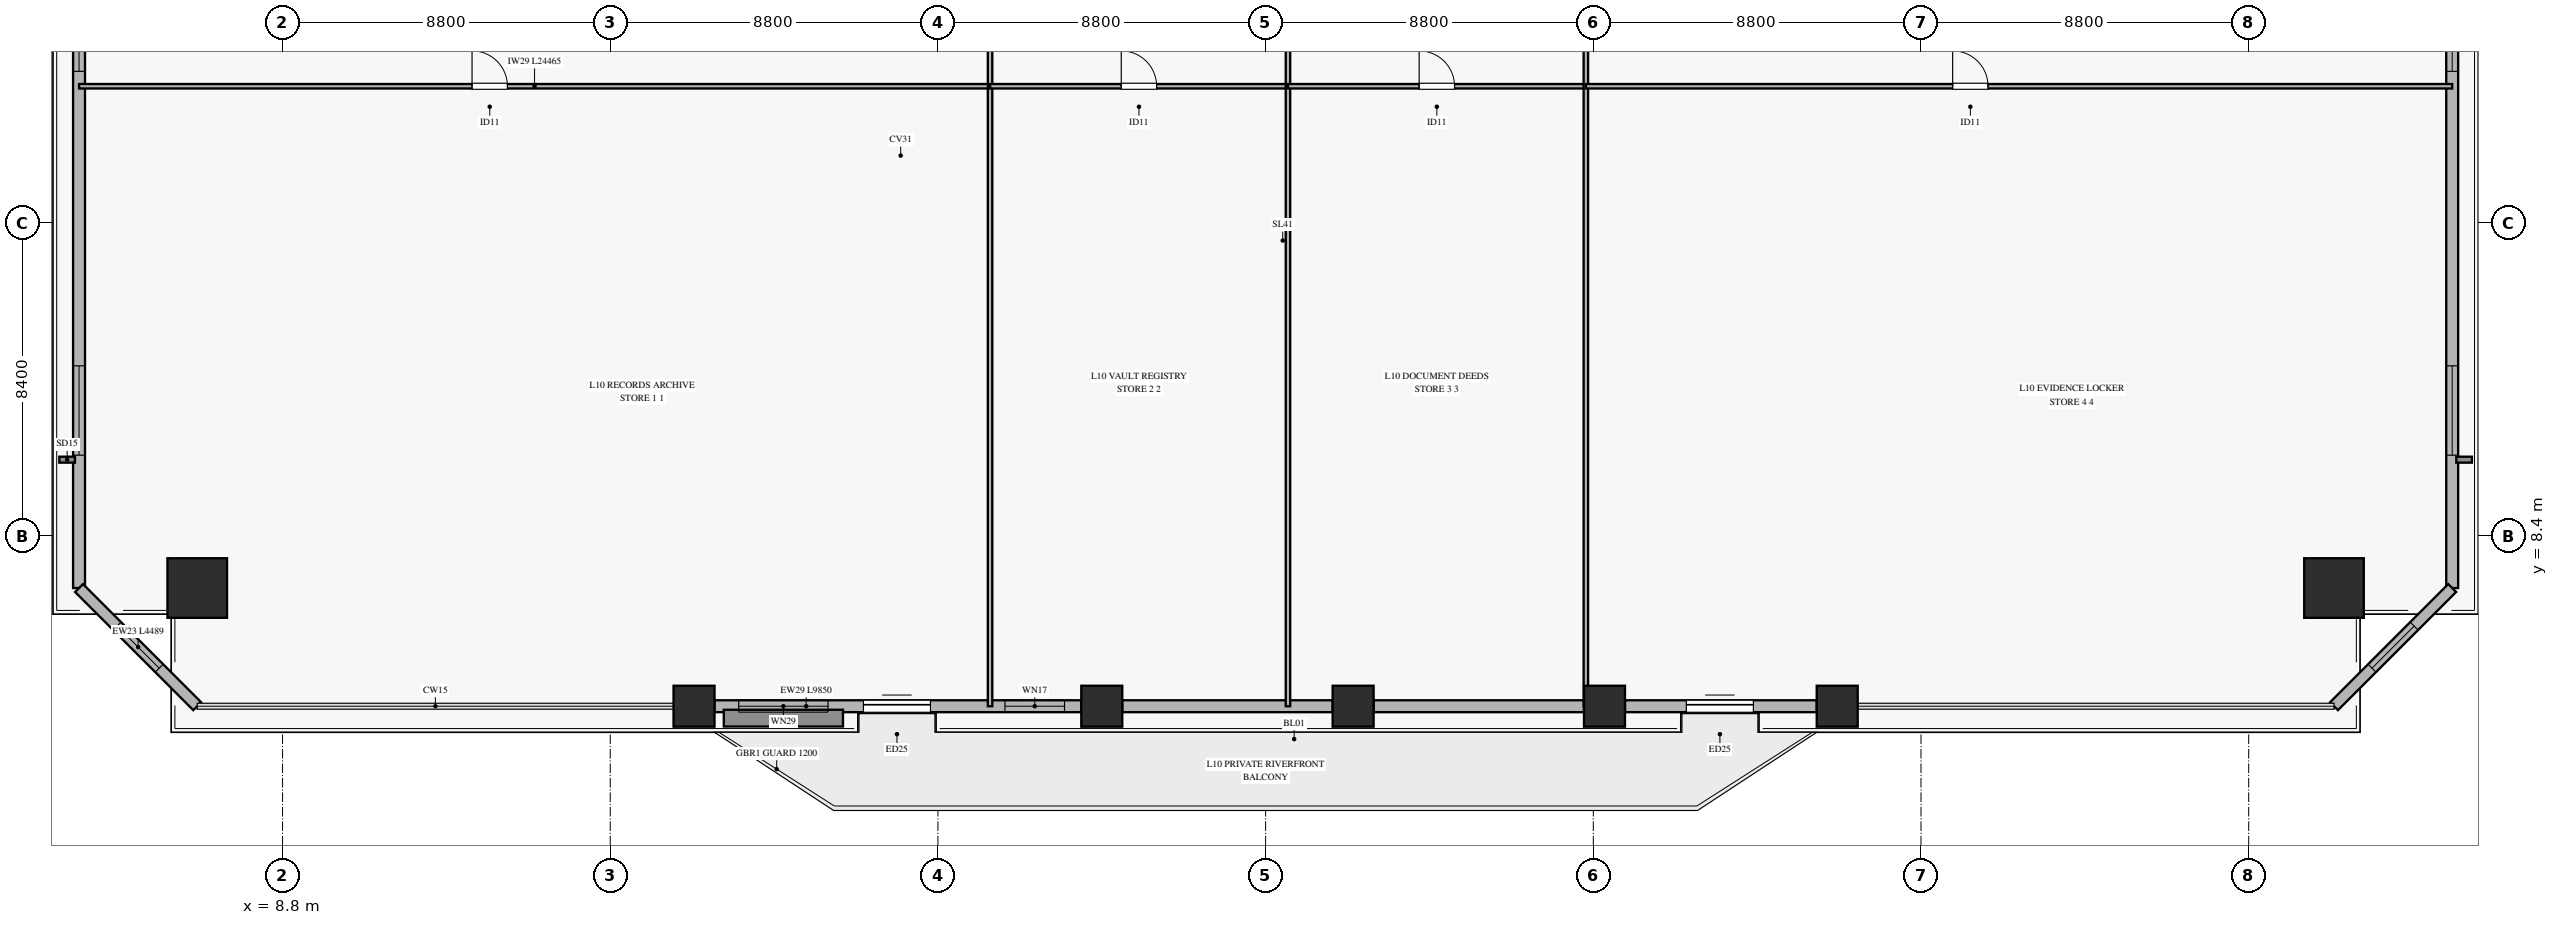
"""IFC4 building model, lengths in metres.
Left out: names, types, materials, properties, quantities, classifications, styles, units other than length and angle.
Written with IfcOpenShell. Run it as: python <this file> out.ifc"""

import sys

from ifc_helpers import new_model, si_unit, direction, frame, frame_2d, origin, origin_2d, place, context, subcontext, project, spatial, rectangle, hollow_rectangle, extrude, source, transform, mapped, element, fill, save


model = new_model("IFC4")
c1 = context("Model", 3, precision=1e-05, world=origin(), true_north=direction((0.0, 1.0)))
c2 = subcontext(c1, "Body", "Model", "MODEL_VIEW")
j1 = project(units=[si_unit("LENGTHUNIT", "METRE"), si_unit("PLANEANGLEUNIT", "RADIAN")], contexts=[c1])
p1 = place(None, origin())
s1 = spatial("IfcSite", under=j1, at=p1, CompositionType="ELEMENT")
p2 = place(p1, origin())
s2 = spatial("IfcBuilding", under=s1, at=p2, CompositionType="ELEMENT")
p3 = place(p2, frame((0.0, 0.0, 41.0)))
s3 = spatial("IfcBuildingStorey", under=s2, at=p3, CompositionType="ELEMENT", Elevation=41.0)
m1 = source(origin(), c2, "Body", "SweptSolid", [
    extrude(hollow_rectangle(XDim=1.6, YDim=1.6, WallThickness=0.075, at=origin_2d()), origin(), (0.0, 0.0, 1.0), 3.68),
])
for number, where, z_axis, x_axis in (
    (1, (6.509, 7.001, 0.0), (0.0, 0.0, 1.0), (1.0, 0.0, 0.0)),
    (2, (63.891, 7.001, 0.0), (0.0, 0.0, 1.0), (1.0, 0.0, 0.0)),
):
    element("IfcColumn", number, at=place(p3, frame(where, z_axis=z_axis, x_axis=x_axis)), inside=s3, PredefinedType="COLUMN", context=c2, shape_type="MappedRepresentation", body=[
        mapped(m1, transform((0.0, 0.0, 0.0), x_axis=(1.0, 0.0, 0.0), y_axis=(0.0, 1.0, 0.0), z_axis=(0.0, 0.0, 1.0), scale=1.0)),
    ])
m2 = source(origin(), c2, "Body", "SweptSolid", [
    extrude(hollow_rectangle(XDim=1.1, YDim=1.1, WallThickness=0.05, at=origin_2d()), origin(), (0.0, 0.0, 1.0), 3.68),
])
for number, where, z_axis, x_axis in (
    (3, (19.85, 3.827, 0.0), (0.0, 0.0, 1.0), (1.0, 0.0, 0.0)),
    (4, (30.8, 3.827, 0.0), (0.0, 0.0, 1.0), (1.0, 0.0, 0.0)),
    (5, (37.55, 3.827, 0.0), (0.0, 0.0, 1.0), (1.0, 0.0, 0.0)),
    (6, (44.3, 3.827, 0.0), (0.0, 0.0, 1.0), (1.0, 0.0, 0.0)),
    (7, (50.55, 3.827, 0.0), (0.0, 0.0, 1.0), (1.0, 0.0, 0.0)),
):
    element("IfcColumn", number, at=place(p3, frame(where, z_axis=z_axis, x_axis=x_axis)), inside=s3, PredefinedType="COLUMN", context=c2, shape_type="MappedRepresentation", body=[
        mapped(m2, transform((0.0, 0.0, 0.0), x_axis=(1.0, 0.0, 0.0), y_axis=(0.0, 1.0, 0.0), z_axis=(0.0, 0.0, 1.0), scale=1.0)),
    ])
p4 = place(p3, frame((20.4, 3.827, 0.0), z_axis=(0.0, 0.0, 1.0), x_axis=(1.0, 0.0, 0.0)))
e8 = element("IfcWall", 8, at=p4, inside=s3, PredefinedType="SOLIDWALL", context=c2, shape_type="SweptSolid", body=[
    extrude(rectangle(XDim=9.85, YDim=0.32, at=frame_2d((4.925, 0.0))), origin(), (0.0, 0.0, 1.0), 3.16),
])
p5 = place(p4, frame((4.0, 0.0, 0.0)))
e9 = element("IfcOpeningElement", 9, at=p5, cuts=e8, PredefinedType="OPENING", context=c2, shape_type="SweptSolid", body=[
    extrude(rectangle(XDim=1.8, YDim=2.25, at=frame_2d((0.9, 1.125))), frame((0.0, 0.17, 0.0), z_axis=(0.0, -1.0, 0.0), x_axis=(1.0, 0.0, 0.0)), (0.0, 0.0, 1.0), 0.34),
])
p6 = place(p4, frame((0.65, 0.0, 0.45)))
e10 = element("IfcOpeningElement", 10, at=p6, cuts=e8, PredefinedType="OPENING", context=c2, shape_type="SweptSolid", body=[
    extrude(rectangle(XDim=2.4, YDim=2.1, at=frame_2d((1.2, 1.05))), frame((0.0, 0.17, 0.0), z_axis=(0.0, -1.0, 0.0), x_axis=(1.0, 0.0, 0.0)), (0.0, 0.0, 1.0), 0.34),
])
p7 = place(p4, frame((7.8, 0.0, 0.45)))
e11 = element("IfcOpeningElement", 11, at=p7, cuts=e8, PredefinedType="OPENING", context=c2, shape_type="SweptSolid", body=[
    extrude(rectangle(XDim=1.6, YDim=2.0, at=frame_2d((0.8, 1.0))), frame((0.0, 0.17, 0.0), z_axis=(0.0, -1.0, 0.0), x_axis=(1.0, 0.0, 0.0)), (0.0, 0.0, 1.0), 0.34),
])
for number, where, z_axis, x_axis in (
    (12, (31.35, 3.827, 0.0), (0.0, 0.0, 1.0), (1.0, 0.0, 0.0)),
    (13, (38.1, 3.827, 0.0), (0.0, 0.0, 1.0), (1.0, 0.0, 0.0)),
):
    element("IfcWall", number, at=place(p3, frame(where, z_axis=z_axis, x_axis=x_axis)), inside=s3, PredefinedType="SOLIDWALL", context=c2, shape_type="SweptSolid", body=[
        extrude(rectangle(XDim=5.65, YDim=0.32, at=frame_2d((2.825, 0.0))), origin(), (0.0, 0.0, 1.0), 3.16),
    ])
p8 = place(p3, frame((44.85, 3.827, 0.0), z_axis=(0.0, 0.0, 1.0), x_axis=(1.0, 0.0, 0.0)))
e14 = element("IfcWall", 14, at=p8, inside=s3, PredefinedType="SOLIDWALL", context=c2, shape_type="SweptSolid", body=[
    extrude(rectangle(XDim=5.15, YDim=0.32, at=frame_2d((2.575, 0.0))), origin(), (0.0, 0.0, 1.0), 3.16),
])
p9 = place(p8, frame((1.65, 0.0, 0.0)))
e15 = element("IfcOpeningElement", 15, at=p9, cuts=e14, PredefinedType="OPENING", context=c2, shape_type="SweptSolid", body=[
    extrude(rectangle(XDim=1.8, YDim=2.25, at=frame_2d((0.9, 1.125))), frame((0.0, 0.17, 0.0), z_axis=(0.0, -1.0, 0.0), x_axis=(1.0, 0.0, 0.0)), (0.0, 0.0, 1.0), 0.34),
])
p10 = place(p3, frame((3.335, 7.001, 0.0), z_axis=(0.0, 0.0, 1.0), x_axis=(0.0, 1.0, 0.0)))
e16 = element("IfcWall", 16, at=p10, inside=s3, PredefinedType="SOLIDWALL", context=c2, shape_type="SweptSolid", body=[
    extrude(rectangle(XDim=17.412, YDim=0.32, at=frame_2d((8.706, 0.0))), origin(), (0.0, 0.0, 1.0), 3.16),
])
p11 = place(p10, frame((3.567, 0.0, 0.45)))
e17 = element("IfcOpeningElement", 17, at=p11, cuts=e16, PredefinedType="OPENING", context=c2, shape_type="SweptSolid", body=[
    extrude(rectangle(XDim=2.4, YDim=2.1, at=frame_2d((1.2, 1.05))), frame((0.0, 0.17, 0.0), z_axis=(0.0, -1.0, 0.0), x_axis=(1.0, 0.0, 0.0)), (0.0, 0.0, 1.0), 0.34),
])
p12 = place(p10, frame((13.875, 0.0, 0.45)))
e18 = element("IfcOpeningElement", 18, at=p12, cuts=e16, PredefinedType="OPENING", context=c2, shape_type="SweptSolid", body=[
    extrude(rectangle(XDim=2.4, YDim=2.1, at=frame_2d((1.2, 1.05))), frame((0.0, 0.17, 0.0), z_axis=(0.0, -1.0, 0.0), x_axis=(1.0, 0.0, 0.0)), (0.0, 0.0, 1.0), 0.34),
])
p13 = place(p3, frame((67.065, 7.001, 0.0), z_axis=(0.0, 0.0, 1.0), x_axis=(0.0, 1.0, 0.0)))
e19 = element("IfcWall", 19, at=p13, inside=s3, PredefinedType="SOLIDWALL", context=c2, shape_type="SweptSolid", body=[
    extrude(rectangle(XDim=17.412, YDim=0.32, at=frame_2d((8.706, 0.0))), origin(), (0.0, 0.0, 1.0), 3.16),
])
p14 = place(p13, frame((3.567, 0.0, 0.45)))
e20 = element("IfcOpeningElement", 20, at=p14, cuts=e19, PredefinedType="OPENING", context=c2, shape_type="SweptSolid", body=[
    extrude(rectangle(XDim=2.4, YDim=2.1, at=frame_2d((1.2, 1.05))), frame((0.0, 0.17, 0.0), z_axis=(0.0, -1.0, 0.0), x_axis=(1.0, 0.0, 0.0)), (0.0, 0.0, 1.0), 0.34),
])
p15 = place(p13, frame((13.875, 0.0, 0.45)))
e21 = element("IfcOpeningElement", 21, at=p15, cuts=e19, PredefinedType="OPENING", context=c2, shape_type="SweptSolid", body=[
    extrude(rectangle(XDim=2.4, YDim=2.1, at=frame_2d((1.2, 1.05))), frame((0.0, 0.17, 0.0), z_axis=(0.0, -1.0, 0.0), x_axis=(1.0, 0.0, 0.0)), (0.0, 0.0, 1.0), 0.34),
])
p16 = place(p3, frame((3.335, 7.001, 0.0), z_axis=(0.0, 0.0, 1.0), x_axis=(0.707106781187, -0.707106781187, 0.0)))
e22 = element("IfcWall", 22, at=p16, inside=s3, PredefinedType="SOLIDWALL", context=c2, shape_type="SweptSolid", body=[
    extrude(rectangle(XDim=4.489, YDim=0.3, at=frame_2d((2.244, 0.0))), origin(), (0.0, 0.0, 1.0), 3.16),
])
p17 = place(p16, frame((1.444, 0.0, 0.45)))
e23 = element("IfcOpeningElement", 23, at=p17, cuts=e22, PredefinedType="OPENING", context=c2, shape_type="SweptSolid", body=[
    extrude(rectangle(XDim=1.6, YDim=2.0, at=frame_2d((0.8, 1.0))), frame((0.0, 0.16, 0.0), z_axis=(0.0, -1.0, 0.0), x_axis=(1.0, 0.0, 0.0)), (0.0, 0.0, 1.0), 0.32),
])
p18 = place(p3, frame((63.891, 3.827, 0.0), z_axis=(0.0, 0.0, 1.0), x_axis=(0.707079585295, 0.707133976032, 0.0)))
e24 = element("IfcWall", 24, at=p18, inside=s3, PredefinedType="SOLIDWALL", context=c2, shape_type="SweptSolid", body=[
    extrude(rectangle(XDim=4.489, YDim=0.3, at=frame_2d((2.244, 0.0))), origin(), (0.0, 0.0, 1.0), 3.16),
])
p19 = place(p18, frame((1.444, 0.0, 0.45)))
e25 = element("IfcOpeningElement", 25, at=p19, cuts=e24, PredefinedType="OPENING", context=c2, shape_type="SweptSolid", body=[
    extrude(rectangle(XDim=1.6, YDim=2.0, at=frame_2d((0.8, 1.0))), frame((0.0, 0.16, 0.0), z_axis=(0.0, -1.0, 0.0), x_axis=(1.0, 0.0, 0.0)), (0.0, 0.0, 1.0), 0.32),
])
p20 = place(p3, frame((3.335, 20.476, 0.0), z_axis=(0.0, 0.0, 1.0), x_axis=(1.0, 0.0, 0.0)))
e26 = element("IfcWall", 26, at=p20, inside=s3, PredefinedType="PARTITIONING", context=c2, shape_type="SweptSolid", body=[
    extrude(rectangle(XDim=24.465, YDim=0.12, at=frame_2d((12.232, 0.0))), origin(), (0.0, 0.0, 1.0), 2.765),
])
p21 = place(p20, frame((10.554, 0.0, 0.0)))
e27 = element("IfcOpeningElement", 27, at=p21, cuts=e26, PredefinedType="OPENING", context=c2, shape_type="SweptSolid", body=[
    extrude(rectangle(XDim=0.95, YDim=2.1, at=frame_2d((0.475, 1.05))), frame((0.0, 0.07, 0.0), z_axis=(0.0, -1.0, 0.0), x_axis=(1.0, 0.0, 0.0)), (0.0, 0.0, 1.0), 0.14),
])
p22 = place(p3, frame((27.8, 3.827, 0.0), z_axis=(0.0, 0.0, 1.0), x_axis=(0.0, 1.0, 0.0)))
e28 = element("IfcWall", 28, at=p22, inside=s3, PredefinedType="PARTITIONING", context=c2, shape_type="SweptSolid", body=[
    extrude(rectangle(XDim=29.573, YDim=0.12, at=frame_2d((14.787, 0.0))), origin(), (0.0, 0.0, 1.0), 3.165),
])
p23 = place(p3, frame((27.8, 20.476, 0.0), z_axis=(0.0, 0.0, 1.0), x_axis=(1.0, 0.0, 0.0)))
e29 = element("IfcWall", 29, at=p23, inside=s3, PredefinedType="PARTITIONING", context=c2, shape_type="SweptSolid", body=[
    extrude(rectangle(XDim=8.0, YDim=0.12, at=frame_2d((4.0, 0.0))), origin(), (0.0, 0.0, 1.0), 2.765),
])
p24 = place(p23, frame((3.523, 0.0, 0.0)))
e30 = element("IfcOpeningElement", 30, at=p24, cuts=e29, PredefinedType="OPENING", context=c2, shape_type="SweptSolid", body=[
    extrude(rectangle(XDim=0.95, YDim=2.1, at=frame_2d((0.475, 1.05))), frame((0.0, 0.07, 0.0), z_axis=(0.0, -1.0, 0.0), x_axis=(1.0, 0.0, 0.0)), (0.0, 0.0, 1.0), 0.14),
])
p25 = place(p3, frame((35.8, 3.827, 0.0), z_axis=(0.0, 0.0, 1.0), x_axis=(0.0, 1.0, 0.0)))
e31 = element("IfcWall", 31, at=p25, inside=s3, PredefinedType="PARTITIONING", context=c2, shape_type="SweptSolid", body=[
    extrude(rectangle(XDim=29.573, YDim=0.12, at=frame_2d((14.787, 0.0))), origin(), (0.0, 0.0, 1.0), 3.165),
])
p26 = place(p3, frame((35.8, 20.476, 0.0), z_axis=(0.0, 0.0, 1.0), x_axis=(1.0, 0.0, 0.0)))
e32 = element("IfcWall", 32, at=p26, inside=s3, PredefinedType="PARTITIONING", context=c2, shape_type="SweptSolid", body=[
    extrude(rectangle(XDim=8.0, YDim=0.12, at=frame_2d((4.0, 0.0))), origin(), (0.0, 0.0, 1.0), 2.765),
])
p27 = place(p26, frame((3.523, 0.0, 0.0)))
e33 = element("IfcOpeningElement", 33, at=p27, cuts=e32, PredefinedType="OPENING", context=c2, shape_type="SweptSolid", body=[
    extrude(rectangle(XDim=0.95, YDim=2.1, at=frame_2d((0.475, 1.05))), frame((0.0, 0.07, 0.0), z_axis=(0.0, -1.0, 0.0), x_axis=(1.0, 0.0, 0.0)), (0.0, 0.0, 1.0), 0.14),
])
p28 = place(p3, frame((43.8, 3.827, 0.0), z_axis=(0.0, 0.0, 1.0), x_axis=(0.0, 1.0, 0.0)))
e34 = element("IfcWall", 34, at=p28, inside=s3, PredefinedType="PARTITIONING", context=c2, shape_type="SweptSolid", body=[
    extrude(rectangle(XDim=29.573, YDim=0.12, at=frame_2d((14.787, 0.0))), origin(), (0.0, 0.0, 1.0), 3.215),
])
p29 = place(p3, frame((43.8, 20.476, 0.0), z_axis=(0.0, 0.0, 1.0), x_axis=(1.0, 0.0, 0.0)))
e35 = element("IfcWall", 35, at=p29, inside=s3, PredefinedType="PARTITIONING", context=c2, shape_type="SweptSolid", body=[
    extrude(rectangle(XDim=23.265, YDim=0.12, at=frame_2d((11.632, 0.0))), origin(), (0.0, 0.0, 1.0), 2.765),
])
p30 = place(p29, frame((9.85, 0.0, 0.0)))
e36 = element("IfcOpeningElement", 36, at=p30, cuts=e35, PredefinedType="OPENING", context=c2, shape_type="SweptSolid", body=[
    extrude(rectangle(XDim=0.95, YDim=2.1, at=frame_2d((0.475, 1.05))), frame((0.0, 0.07, 0.0), z_axis=(0.0, -1.0, 0.0), x_axis=(1.0, 0.0, 0.0)), (0.0, 0.0, 1.0), 0.14),
])
m3 = source(origin(), c2, "Body", "SweptSolid", [
    extrude(rectangle(XDim=1.8, YDim=2.25, at=frame_2d((0.9, 1.125))), frame((0.0, 0.025, 0.0), z_axis=(0.0, -1.0, 0.0), x_axis=(1.0, 0.0, 0.0)), (0.0, 0.0, 1.0), 0.05),
])
p31 = place(p5, origin())
e37 = element("IfcDoor", 37, at=p31, inside=s3, OperationType="SLIDING_TO_LEFT", PredefinedType="DOOR", context=c2, shape_type="MappedRepresentation", body=[
    mapped(m3, transform((0.0, 0.0, 0.0), x_axis=(1.0, 0.0, 0.0), y_axis=(0.0, 1.0, 0.0), z_axis=(0.0, 0.0, 1.0), scale=1.0)),
])
fill(e9, e37)
m4 = source(origin(), c2, "Body", "SweptSolid", [
    extrude(rectangle(XDim=2.4, YDim=2.1, at=frame_2d((1.2, 1.05))), frame((0.0, 0.03, 0.0), z_axis=(0.0, -1.0, 0.0), x_axis=(1.0, 0.0, 0.0)), (0.0, 0.0, 1.0), 0.06),
])
p32 = place(p6, origin())
e38 = element("IfcWindow", 38, at=p32, inside=s3, PartitioningType="SINGLE_PANEL", PredefinedType="WINDOW", context=c2, shape_type="MappedRepresentation", body=[
    mapped(m4, transform((0.0, 0.0, 0.0), x_axis=(1.0, 0.0, 0.0), y_axis=(0.0, 1.0, 0.0), z_axis=(0.0, 0.0, 1.0), scale=1.0)),
])
fill(e10, e38)
m5 = source(origin(), c2, "Body", "SweptSolid", [
    extrude(rectangle(XDim=1.6, YDim=2.0, at=frame_2d((0.8, 1.0))), frame((0.0, 0.03, 0.0), z_axis=(0.0, -1.0, 0.0), x_axis=(1.0, 0.0, 0.0)), (0.0, 0.0, 1.0), 0.06),
])
p33 = place(p7, origin())
e39 = element("IfcWindow", 39, at=p33, inside=s3, PartitioningType="SINGLE_PANEL", PredefinedType="WINDOW", context=c2, shape_type="MappedRepresentation", body=[
    mapped(m5, transform((0.0, 0.0, 0.0), x_axis=(1.0, 0.0, 0.0), y_axis=(0.0, 1.0, 0.0), z_axis=(0.0, 0.0, 1.0), scale=1.0)),
])
fill(e11, e39)
p34 = place(p9, origin())
e40 = element("IfcDoor", 40, at=p34, inside=s3, OperationType="SLIDING_TO_LEFT", PredefinedType="DOOR", context=c2, shape_type="MappedRepresentation", body=[
    mapped(m3, transform((0.0, 0.0, 0.0), x_axis=(1.0, 0.0, 0.0), y_axis=(0.0, 1.0, 0.0), z_axis=(0.0, 0.0, 1.0), scale=1.0)),
])
fill(e15, e40)
p35 = place(p11, origin())
e41 = element("IfcWindow", 41, at=p35, inside=s3, PartitioningType="SINGLE_PANEL", PredefinedType="WINDOW", context=c2, shape_type="MappedRepresentation", body=[
    mapped(m4, transform((0.0, 0.0, 0.0), x_axis=(1.0, 0.0, 0.0), y_axis=(0.0, 1.0, 0.0), z_axis=(0.0, 0.0, 1.0), scale=1.0)),
])
fill(e17, e41)
p36 = place(p12, origin())
e42 = element("IfcWindow", 42, at=p36, inside=s3, PartitioningType="SINGLE_PANEL", PredefinedType="WINDOW", context=c2, shape_type="MappedRepresentation", body=[
    mapped(m4, transform((0.0, 0.0, 0.0), x_axis=(1.0, 0.0, 0.0), y_axis=(0.0, 1.0, 0.0), z_axis=(0.0, 0.0, 1.0), scale=1.0)),
])
fill(e18, e42)
p37 = place(p14, origin())
e43 = element("IfcWindow", 43, at=p37, inside=s3, PartitioningType="SINGLE_PANEL", PredefinedType="WINDOW", context=c2, shape_type="MappedRepresentation", body=[
    mapped(m4, transform((0.0, 0.0, 0.0), x_axis=(1.0, 0.0, 0.0), y_axis=(0.0, 1.0, 0.0), z_axis=(0.0, 0.0, 1.0), scale=1.0)),
])
fill(e20, e43)
p38 = place(p15, origin())
e44 = element("IfcWindow", 44, at=p38, inside=s3, PartitioningType="SINGLE_PANEL", PredefinedType="WINDOW", context=c2, shape_type="MappedRepresentation", body=[
    mapped(m4, transform((0.0, 0.0, 0.0), x_axis=(1.0, 0.0, 0.0), y_axis=(0.0, 1.0, 0.0), z_axis=(0.0, 0.0, 1.0), scale=1.0)),
])
fill(e21, e44)
p39 = place(p17, origin())
e45 = element("IfcWindow", 45, at=p39, inside=s3, PartitioningType="SINGLE_PANEL", PredefinedType="WINDOW", context=c2, shape_type="MappedRepresentation", body=[
    mapped(m5, transform((0.0, 0.0, 0.0), x_axis=(1.0, 0.0, 0.0), y_axis=(0.0, 1.0, 0.0), z_axis=(0.0, 0.0, 1.0), scale=1.0)),
])
fill(e23, e45)
p40 = place(p19, origin())
e46 = element("IfcWindow", 46, at=p40, inside=s3, PartitioningType="SINGLE_PANEL", PredefinedType="WINDOW", context=c2, shape_type="MappedRepresentation", body=[
    mapped(m5, transform((0.0, 0.0, 0.0), x_axis=(1.0, 0.0, 0.0), y_axis=(0.0, 1.0, 0.0), z_axis=(0.0, 0.0, 1.0), scale=1.0)),
])
fill(e25, e46)
m6 = source(origin(), c2, "Body", "SweptSolid", [
    extrude(rectangle(XDim=0.95, YDim=2.1, at=frame_2d((0.475, 1.05))), frame((0.0, 0.025, 0.0), z_axis=(0.0, -1.0, 0.0), x_axis=(1.0, 0.0, 0.0)), (0.0, 0.0, 1.0), 0.05),
])
p41 = place(p21, origin())
e47 = element("IfcDoor", 47, at=p41, inside=s3, OperationType="SINGLE_SWING_LEFT", PredefinedType="DOOR", context=c2, shape_type="MappedRepresentation", body=[
    mapped(m6, transform((0.0, 0.0, 0.0), x_axis=(1.0, 0.0, 0.0), y_axis=(0.0, 1.0, 0.0), z_axis=(0.0, 0.0, 1.0), scale=1.0)),
])
fill(e27, e47)
p42 = place(p24, origin())
e48 = element("IfcDoor", 48, at=p42, inside=s3, OperationType="SINGLE_SWING_LEFT", PredefinedType="DOOR", context=c2, shape_type="MappedRepresentation", body=[
    mapped(m6, transform((0.0, 0.0, 0.0), x_axis=(1.0, 0.0, 0.0), y_axis=(0.0, 1.0, 0.0), z_axis=(0.0, 0.0, 1.0), scale=1.0)),
])
fill(e30, e48)
p43 = place(p27, origin())
e49 = element("IfcDoor", 49, at=p43, inside=s3, OperationType="SINGLE_SWING_LEFT", PredefinedType="DOOR", context=c2, shape_type="MappedRepresentation", body=[
    mapped(m6, transform((0.0, 0.0, 0.0), x_axis=(1.0, 0.0, 0.0), y_axis=(0.0, 1.0, 0.0), z_axis=(0.0, 0.0, 1.0), scale=1.0)),
])
fill(e33, e49)
p44 = place(p30, origin())
e50 = element("IfcDoor", 50, at=p44, inside=s3, OperationType="SINGLE_SWING_LEFT", PredefinedType="DOOR", context=c2, shape_type="MappedRepresentation", body=[
    mapped(m6, transform((0.0, 0.0, 0.0), x_axis=(1.0, 0.0, 0.0), y_axis=(0.0, 1.0, 0.0), z_axis=(0.0, 0.0, 1.0), scale=1.0)),
])
fill(e36, e50)
save(model, sys.argv[1])
